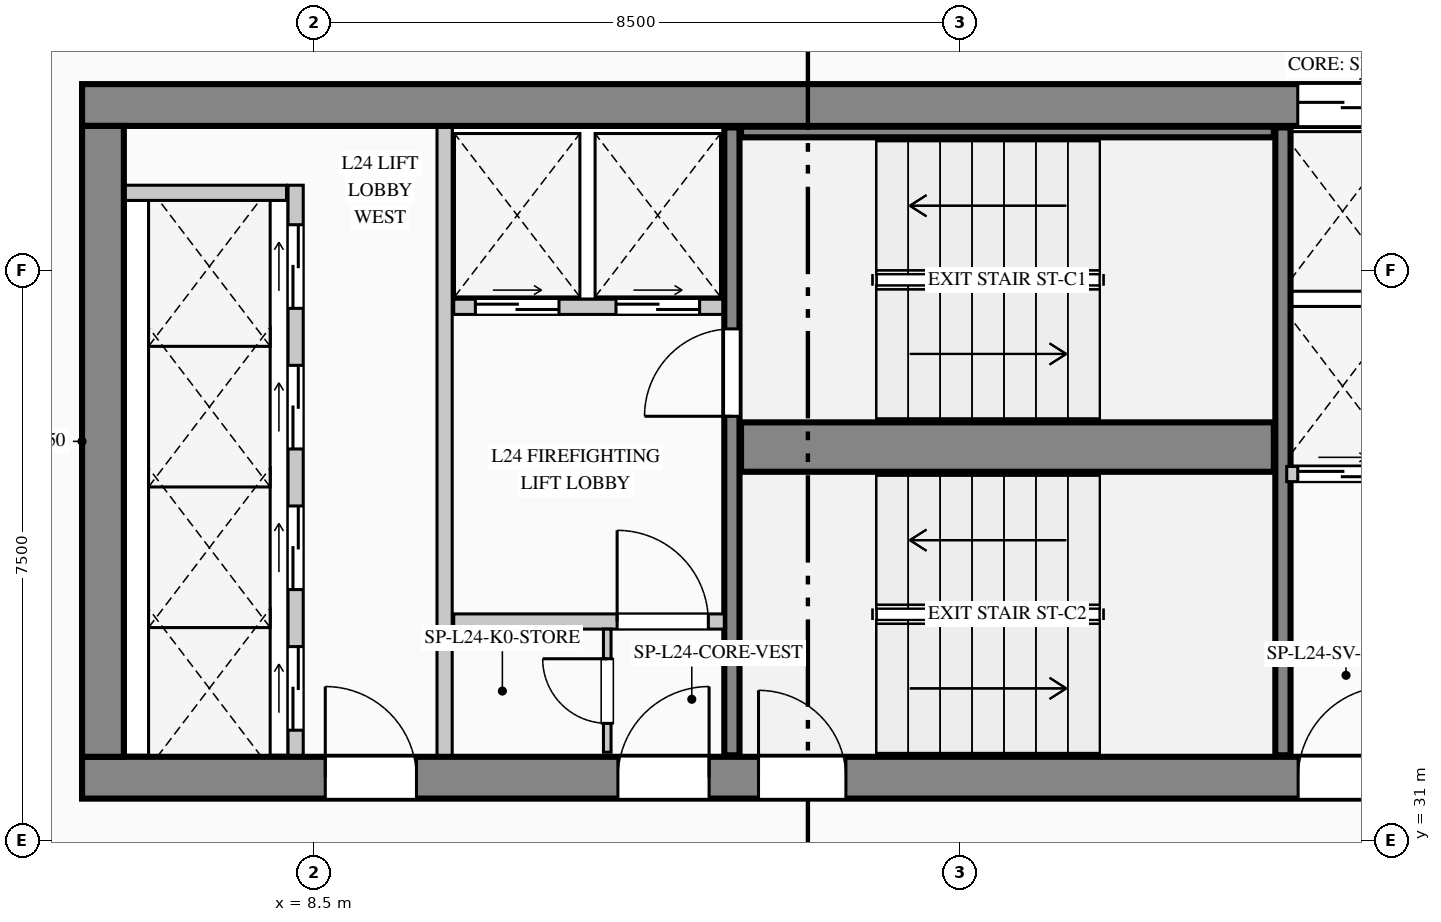
"""IFC4 building model, lengths in metres.
Left out: names, types, materials, properties, quantities, classifications, styles, units other than length and angle.
Written with IfcOpenShell. Run it as: python <this file> out.ifc"""

import sys

from ifc_helpers import new_model, si_unit, direction, frame, frame_2d, origin, place, context, subcontext, project, spatial, rectangle, extrude, element, fill, save


model = new_model("IFC4")
c1 = context("Model", 3, precision=1e-05, world=origin(), true_north=direction((0.0, 1.0)))
c2 = subcontext(c1, "Body", "Model", "MODEL_VIEW")
j1 = project(units=[si_unit("LENGTHUNIT", "METRE"), si_unit("PLANEANGLEUNIT", "RADIAN")], contexts=[c1])
p1 = place(None, origin())
s1 = spatial("IfcSite", under=j1, at=p1, CompositionType="ELEMENT")
p2 = place(p1, origin())
s2 = spatial("IfcBuilding", under=s1, at=p2, CompositionType="ELEMENT")
p3 = place(p2, frame((0.0, 0.0, 106.2)))
s3 = spatial("IfcBuildingStorey", under=s2, at=p3, CompositionType="ELEMENT", Elevation=106.2)
p4 = place(p3, frame((5.45, 40.675, 0.0), z_axis=(0.0, 0.0, 1.0), x_axis=(1.0, 0.0, 0.0)))
e1 = element("IfcWall", 1, at=p4, inside=s3, PredefinedType="SHEAR", context=c2, shape_type="SweptSolid", body=[
    extrude(rectangle(XDim=17.95, YDim=0.55, at=frame_2d((8.975, 0.0))), origin(), (0.0, 0.0, 1.0), 5.2),
])
p5 = place(p4, frame((15.995, 0.0, 0.0)))
e2 = element("IfcOpeningElement", 2, at=p5, cuts=e1, PredefinedType="OPENING", context=c2, shape_type="SweptSolid", body=[
    extrude(rectangle(XDim=1.18, YDim=2.25, at=frame_2d((0.59, 1.125))), frame((0.0, 0.285, 0.0), z_axis=(0.0, -1.0, 0.0), x_axis=(1.0, 0.0, 0.0)), (0.0, 0.0, 1.0), 0.57),
])
p6 = place(p3, frame((5.45, 31.825, 0.0), z_axis=(0.0, 0.0, 1.0), x_axis=(1.0, 0.0, 0.0)))
e3 = element("IfcWall", 3, at=p6, inside=s3, PredefinedType="SHEAR", context=c2, shape_type="SweptSolid", body=[
    extrude(rectangle(XDim=17.95, YDim=0.55, at=frame_2d((8.975, 0.0))), origin(), (0.0, 0.0, 1.0), 5.2),
])
p7 = place(p6, frame((3.2, 0.0, 0.0)))
e4 = element("IfcOpeningElement", 4, at=p7, cuts=e3, PredefinedType="OPENING", context=c2, shape_type="SweptSolid", body=[
    extrude(rectangle(XDim=1.2, YDim=2.2, at=frame_2d((0.6, 1.1))), frame((0.0, 0.285, 0.0), z_axis=(0.0, -1.0, 0.0), x_axis=(1.0, 0.0, 0.0)), (0.0, 0.0, 1.0), 0.57),
])
p8 = place(p6, frame((7.05, 0.0, 0.0)))
e5 = element("IfcOpeningElement", 5, at=p8, cuts=e3, PredefinedType="OPENING", context=c2, shape_type="SweptSolid", body=[
    extrude(rectangle(XDim=1.2, YDim=2.2, at=frame_2d((0.6, 1.1))), frame((0.0, 0.285, 0.0), z_axis=(0.0, -1.0, 0.0), x_axis=(1.0, 0.0, 0.0)), (0.0, 0.0, 1.0), 0.57),
])
p9 = place(p6, frame((8.9, 0.0, 0.0)))
e6 = element("IfcOpeningElement", 6, at=p9, cuts=e3, PredefinedType="OPENING", context=c2, shape_type="SweptSolid", body=[
    extrude(rectangle(XDim=1.15, YDim=2.2, at=frame_2d((0.575, 1.1))), frame((0.0, 0.285, 0.0), z_axis=(0.0, -1.0, 0.0), x_axis=(1.0, 0.0, 0.0)), (0.0, 0.0, 1.0), 0.57),
])
p10 = place(p6, frame((16.0, 0.0, 0.0)))
e7 = element("IfcOpeningElement", 7, at=p10, cuts=e3, PredefinedType="OPENING", context=c2, shape_type="SweptSolid", body=[
    extrude(rectangle(XDim=1.2, YDim=2.2, at=frame_2d((0.6, 1.1))), frame((0.0, 0.285, 0.0), z_axis=(0.0, -1.0, 0.0), x_axis=(1.0, 0.0, 0.0)), (0.0, 0.0, 1.0), 0.57),
])
p11 = place(p3, frame((5.725, 32.1, 0.0), z_axis=(0.0, 0.0, 1.0), x_axis=(0.0, 1.0, 0.0)))
e8 = element("IfcWall", 8, at=p11, inside=s3, PredefinedType="SHEAR", context=c2, shape_type="SweptSolid", body=[
    extrude(rectangle(XDim=8.3, YDim=0.55, at=frame_2d((4.15, 0.0))), origin(), (0.0, 0.0, 1.0), 5.2),
])
p12 = place(p3, frame((14.0, 32.12, 0.0), z_axis=(0.0, 0.0, 1.0), x_axis=(0.0, 1.0, 0.0)))
e9 = element("IfcWall", 9, at=p12, inside=s3, PredefinedType="SHEAR", context=c2, shape_type="SweptSolid", body=[
    extrude(rectangle(XDim=8.26, YDim=0.2, at=frame_2d((4.13, 0.0))), origin(), (0.0, 0.0, 1.0), 5.2),
])
p13 = place(p12, frame((4.46, 0.0, 0.0)))
e10 = element("IfcOpeningElement", 10, at=p13, cuts=e9, PredefinedType="OPENING", context=c2, shape_type="SweptSolid", body=[
    extrude(rectangle(XDim=1.15, YDim=2.2, at=frame_2d((0.575, 1.1))), frame((0.0, 0.11, 0.0), z_axis=(0.0, -1.0, 0.0), x_axis=(1.0, 0.0, 0.0)), (0.0, 0.0, 1.0), 0.22),
])
p14 = place(p3, frame((14.12, 36.175, 0.0), z_axis=(0.0, 0.0, 1.0), x_axis=(1.0, 0.0, 0.0)))
e11 = element("IfcWall", 11, at=p14, inside=s3, PredefinedType="SHEAR", context=c2, shape_type="SweptSolid", body=[
    extrude(rectangle(XDim=7.01, YDim=0.65, at=frame_2d((3.505, 0.0))), origin(), (0.0, 0.0, 1.0), 5.2),
])
p15 = place(p3, frame((21.25, 32.12, 0.0), z_axis=(0.0, 0.0, 1.0), x_axis=(0.0, 1.0, 0.0)))
e12 = element("IfcWall", 12, at=p15, inside=s3, PredefinedType="SHEAR", context=c2, shape_type="SweptSolid", body=[
    extrude(rectangle(XDim=8.26, YDim=0.2, at=frame_2d((4.13, 0.0))), origin(), (0.0, 0.0, 1.0), 5.2),
])
p16 = place(p3, frame((14.12, 40.32, 0.0), z_axis=(0.0, 0.0, 1.0), x_axis=(1.0, 0.0, 0.0)))
e13 = element("IfcWall", 13, at=p16, inside=s3, PredefinedType="SHEAR", context=c2, shape_type="SweptSolid", body=[
    extrude(rectangle(XDim=7.01, YDim=0.14, at=frame_2d((3.505, 0.0))), origin(), (0.0, 0.0, 1.0), 5.2),
])
p17 = place(p3, frame((8.002, 4.74, 0.0), z_axis=(0.0, 0.0, 1.0), x_axis=(-0.136991218313, 0.99057226193, 0.0)))
e14 = element("IfcWall", 14, at=p17, inside=s3, PredefinedType="STANDARD", context=c2, shape_type="SweptSolid", body=[
    extrude(rectangle(XDim=36.868, YDim=0.28, at=frame_2d((18.434, 0.0))), origin(), (0.0, 0.0, 1.0), 4.94),
])
p18 = place(p3, frame((8.26, 32.12, 0.0), z_axis=(0.0, 0.0, 1.0), x_axis=(0.0, 1.0, 0.0)))
e15 = element("IfcWall", 15, at=p18, inside=s3, PredefinedType="PARTITIONING", context=c2, shape_type="SweptSolid", body=[
    extrude(rectangle(XDim=7.5, YDim=0.2, at=frame_2d((3.75, 0.0))), origin(), (0.0, 0.0, 1.0), 4.94),
])
p19 = place(p18, frame((0.33, 0.0, 0.0)))
e16 = element("IfcOpeningElement", 16, at=p19, cuts=e15, PredefinedType="OPENING", context=c2, shape_type="SweptSolid", body=[
    extrude(rectangle(XDim=1.1, YDim=2.2, at=frame_2d((0.55, 1.1))), frame((0.0, 0.11, 0.0), z_axis=(0.0, -1.0, 0.0), x_axis=(1.0, 0.0, 0.0)), (0.0, 0.0, 1.0), 0.22),
])
p20 = place(p18, frame((2.18, 0.0, 0.0)))
e17 = element("IfcOpeningElement", 17, at=p20, cuts=e15, PredefinedType="OPENING", context=c2, shape_type="SweptSolid", body=[
    extrude(rectangle(XDim=1.1, YDim=2.2, at=frame_2d((0.55, 1.1))), frame((0.0, 0.11, 0.0), z_axis=(0.0, -1.0, 0.0), x_axis=(1.0, 0.0, 0.0)), (0.0, 0.0, 1.0), 0.22),
])
p21 = place(p18, frame((4.03, 0.0, 0.0)))
e18 = element("IfcOpeningElement", 18, at=p21, cuts=e15, PredefinedType="OPENING", context=c2, shape_type="SweptSolid", body=[
    extrude(rectangle(XDim=1.1, YDim=2.2, at=frame_2d((0.55, 1.1))), frame((0.0, 0.11, 0.0), z_axis=(0.0, -1.0, 0.0), x_axis=(1.0, 0.0, 0.0)), (0.0, 0.0, 1.0), 0.22),
])
p22 = place(p18, frame((5.88, 0.0, 0.0)))
e19 = element("IfcOpeningElement", 19, at=p22, cuts=e15, PredefinedType="OPENING", context=c2, shape_type="SweptSolid", body=[
    extrude(rectangle(XDim=1.1, YDim=2.2, at=frame_2d((0.55, 1.1))), frame((0.0, 0.11, 0.0), z_axis=(0.0, -1.0, 0.0), x_axis=(1.0, 0.0, 0.0)), (0.0, 0.0, 1.0), 0.22),
])
p23 = place(p3, frame((6.02, 39.52, 0.0), z_axis=(0.0, 0.0, 1.0), x_axis=(1.0, 0.0, 0.0)))
e20 = element("IfcWall", 20, at=p23, inside=s3, PredefinedType="PARTITIONING", context=c2, shape_type="SweptSolid", body=[
    extrude(rectangle(XDim=2.12, YDim=0.2, at=frame_2d((1.06, 0.0))), origin(), (0.0, 0.0, 1.0), 4.94),
])
p24 = place(p3, frame((10.22, 32.12, 0.0), z_axis=(0.0, 0.0, 1.0), x_axis=(0.0, 1.0, 0.0)))
e21 = element("IfcWall", 21, at=p24, inside=s3, PredefinedType="PARTITIONING", context=c2, shape_type="SweptSolid", body=[
    extrude(rectangle(XDim=8.26, YDim=0.2, at=frame_2d((4.13, 0.0))), origin(), (0.0, 0.0, 1.0), 4.94),
])
p25 = place(p3, frame((10.34, 38.02, 0.0), z_axis=(0.0, 0.0, 1.0), x_axis=(1.0, 0.0, 0.0)))
e22 = element("IfcWall", 22, at=p25, inside=s3, PredefinedType="PARTITIONING", context=c2, shape_type="SweptSolid", body=[
    extrude(rectangle(XDim=3.54, YDim=0.2, at=frame_2d((1.77, 0.0))), origin(), (0.0, 0.0, 1.0), 4.94),
])
p26 = place(p25, frame((0.285, 0.0, 0.0)))
e23 = element("IfcOpeningElement", 23, at=p26, cuts=e22, PredefinedType="OPENING", context=c2, shape_type="SweptSolid", body=[
    extrude(rectangle(XDim=1.1, YDim=2.2, at=frame_2d((0.55, 1.1))), frame((0.0, 0.11, 0.0), z_axis=(0.0, -1.0, 0.0), x_axis=(1.0, 0.0, 0.0)), (0.0, 0.0, 1.0), 0.22),
])
p27 = place(p25, frame((2.135, 0.0, 0.0)))
e24 = element("IfcOpeningElement", 24, at=p27, cuts=e22, PredefinedType="OPENING", context=c2, shape_type="SweptSolid", body=[
    extrude(rectangle(XDim=1.1, YDim=2.2, at=frame_2d((0.55, 1.1))), frame((0.0, 0.11, 0.0), z_axis=(0.0, -1.0, 0.0), x_axis=(1.0, 0.0, 0.0)), (0.0, 0.0, 1.0), 0.22),
])
p28 = place(p3, frame((10.34, 33.88, 0.0), z_axis=(0.0, 0.0, 1.0), x_axis=(1.0, 0.0, 0.0)))
e25 = element("IfcWall", 25, at=p28, inside=s3, PredefinedType="PARTITIONING", context=c2, shape_type="SweptSolid", body=[
    extrude(rectangle(XDim=3.56, YDim=0.2, at=frame_2d((1.78, 0.0))), origin(), (0.0, 0.0, 1.0), 4.94),
])
p29 = place(p28, frame((2.15, 0.0, 0.0)))
e26 = element("IfcOpeningElement", 26, at=p29, cuts=e25, PredefinedType="OPENING", context=c2, shape_type="SweptSolid", body=[
    extrude(rectangle(XDim=1.2, YDim=2.2, at=frame_2d((0.6, 1.1))), frame((0.0, 0.11, 0.0), z_axis=(0.0, -1.0, 0.0), x_axis=(1.0, 0.0, 0.0)), (0.0, 0.0, 1.0), 0.22),
])
p30 = place(p3, frame((12.36, 32.16, 0.0), z_axis=(0.0, 0.0, 1.0), x_axis=(0.0, 1.0, 0.0)))
e27 = element("IfcWall", 27, at=p30, inside=s3, PredefinedType="PARTITIONING", context=c2, shape_type="SweptSolid", body=[
    extrude(rectangle(XDim=1.62, YDim=0.1, at=frame_2d((0.81, 0.0))), origin(), (0.0, 0.0, 1.0), 4.94),
])
p31 = place(p30, frame((0.38, 0.0, 0.0)))
e28 = element("IfcOpeningElement", 28, at=p31, cuts=e27, PredefinedType="OPENING", context=c2, shape_type="SweptSolid", body=[
    extrude(rectangle(XDim=0.85, YDim=2.1, at=frame_2d((0.425, 1.05))), frame((0.0, 0.06, 0.0), z_axis=(0.0, -1.0, 0.0), x_axis=(1.0, 0.0, 0.0)), (0.0, 0.0, 1.0), 0.12),
])
p32 = place(p3, frame((21.3, 35.82, 0.0), z_axis=(0.0, 0.0, 1.0), x_axis=(1.0, 0.0, 0.0)))
e29 = element("IfcWall", 29, at=p32, inside=s3, PredefinedType="PARTITIONING", context=c2, shape_type="SweptSolid", body=[
    extrude(rectangle(XDim=1.5, YDim=0.2, at=frame_2d((0.75, 0.0))), origin(), (0.0, 0.0, 1.0), 4.94),
])
p33 = place(p32, frame((0.145, 0.0, 0.0)))
e30 = element("IfcOpeningElement", 30, at=p33, cuts=e29, PredefinedType="OPENING", context=c2, shape_type="SweptSolid", body=[
    extrude(rectangle(XDim=1.18, YDim=2.25, at=frame_2d((0.59, 1.125))), frame((0.0, 0.11, 0.0), z_axis=(0.0, -1.0, 0.0), x_axis=(1.0, 0.0, 0.0)), (0.0, 0.0, 1.0), 0.22),
])
p34 = place(p7, origin())
e31 = element("IfcDoor", 31, at=p34, inside=s3, OperationType="SINGLE_SWING_LEFT", PredefinedType="DOOR", context=c2, shape_type="SweptSolid", body=[
    extrude(rectangle(XDim=1.2, YDim=2.2, at=frame_2d((0.6, 1.1))), frame((0.0, 0.025, 0.0), z_axis=(0.0, -1.0, 0.0), x_axis=(1.0, 0.0, 0.0)), (0.0, 0.0, 1.0), 0.05),
])
fill(e4, e31)
p35 = place(p8, origin())
e32 = element("IfcDoor", 32, at=p35, inside=s3, OperationType="SINGLE_SWING_RIGHT", PredefinedType="DOOR", context=c2, shape_type="SweptSolid", body=[
    extrude(rectangle(XDim=1.2, YDim=2.2, at=frame_2d((0.6, 1.1))), frame((0.0, 0.025, 0.0), z_axis=(0.0, -1.0, 0.0), x_axis=(1.0, 0.0, 0.0)), (0.0, 0.0, 1.0), 0.05),
])
fill(e5, e32)
p36 = place(p9, origin())
e33 = element("IfcDoor", 33, at=p36, inside=s3, OperationType="SINGLE_SWING_LEFT", PredefinedType="DOOR", context=c2, shape_type="SweptSolid", body=[
    extrude(rectangle(XDim=1.15, YDim=2.2, at=frame_2d((0.575, 1.1))), frame((0.0, 0.025, 0.0), z_axis=(0.0, -1.0, 0.0), x_axis=(1.0, 0.0, 0.0)), (0.0, 0.0, 1.0), 0.05),
])
fill(e6, e33)
p37 = place(p10, origin())
e34 = element("IfcDoor", 34, at=p37, inside=s3, OperationType="SINGLE_SWING_RIGHT", PredefinedType="DOOR", context=c2, shape_type="SweptSolid", body=[
    extrude(rectangle(XDim=1.2, YDim=2.2, at=frame_2d((0.6, 1.1))), frame((0.0, 0.025, 0.0), z_axis=(0.0, -1.0, 0.0), x_axis=(1.0, 0.0, 0.0)), (0.0, 0.0, 1.0), 0.05),
])
fill(e7, e34)
p38 = place(p29, origin())
e35 = element("IfcDoor", 35, at=p38, inside=s3, OperationType="SINGLE_SWING_LEFT", PredefinedType="DOOR", context=c2, shape_type="SweptSolid", body=[
    extrude(rectangle(XDim=1.2, YDim=2.2, at=frame_2d((0.6, 1.1))), frame((0.0, 0.025, 0.0), z_axis=(0.0, -1.0, 0.0), x_axis=(1.0, 0.0, 0.0)), (0.0, 0.0, 1.0), 0.05),
])
fill(e26, e35)
p39 = place(p31, origin())
e36 = element("IfcDoor", 36, at=p39, inside=s3, OperationType="SINGLE_SWING_RIGHT", PredefinedType="DOOR", context=c2, shape_type="SweptSolid", body=[
    extrude(rectangle(XDim=0.85, YDim=2.1, at=frame_2d((0.425, 1.05))), frame((0.0, 0.025, 0.0), z_axis=(0.0, -1.0, 0.0), x_axis=(1.0, 0.0, 0.0)), (0.0, 0.0, 1.0), 0.05),
])
fill(e28, e36)
p40 = place(p13, origin())
e37 = element("IfcDoor", 37, at=p40, inside=s3, OperationType="SINGLE_SWING_LEFT", PredefinedType="DOOR", context=c2, shape_type="SweptSolid", body=[
    extrude(rectangle(XDim=1.15, YDim=2.2, at=frame_2d((0.575, 1.1))), frame((0.0, 0.025, 0.0), z_axis=(0.0, -1.0, 0.0), x_axis=(1.0, 0.0, 0.0)), (0.0, 0.0, 1.0), 0.05),
])
fill(e10, e37)
p41 = place(p19, origin())
e38 = element("IfcDoor", 38, at=p41, inside=s3, OperationType="DOUBLE_DOOR_SLIDING", PredefinedType="DOOR", context=c2, shape_type="SweptSolid", body=[
    extrude(rectangle(XDim=1.1, YDim=2.2, at=frame_2d((0.55, 1.1))), frame((0.0, 0.025, 0.0), z_axis=(0.0, -1.0, 0.0), x_axis=(1.0, 0.0, 0.0)), (0.0, 0.0, 1.0), 0.05),
])
fill(e16, e38)
p42 = place(p20, origin())
e39 = element("IfcDoor", 39, at=p42, inside=s3, OperationType="DOUBLE_DOOR_SLIDING", PredefinedType="DOOR", context=c2, shape_type="SweptSolid", body=[
    extrude(rectangle(XDim=1.1, YDim=2.2, at=frame_2d((0.55, 1.1))), frame((0.0, 0.025, 0.0), z_axis=(0.0, -1.0, 0.0), x_axis=(1.0, 0.0, 0.0)), (0.0, 0.0, 1.0), 0.05),
])
fill(e17, e39)
p43 = place(p21, origin())
e40 = element("IfcDoor", 40, at=p43, inside=s3, OperationType="DOUBLE_DOOR_SLIDING", PredefinedType="DOOR", context=c2, shape_type="SweptSolid", body=[
    extrude(rectangle(XDim=1.1, YDim=2.2, at=frame_2d((0.55, 1.1))), frame((0.0, 0.025, 0.0), z_axis=(0.0, -1.0, 0.0), x_axis=(1.0, 0.0, 0.0)), (0.0, 0.0, 1.0), 0.05),
])
fill(e18, e40)
p44 = place(p22, origin())
e41 = element("IfcDoor", 41, at=p44, inside=s3, OperationType="DOUBLE_DOOR_SLIDING", PredefinedType="DOOR", context=c2, shape_type="SweptSolid", body=[
    extrude(rectangle(XDim=1.1, YDim=2.2, at=frame_2d((0.55, 1.1))), frame((0.0, 0.025, 0.0), z_axis=(0.0, -1.0, 0.0), x_axis=(1.0, 0.0, 0.0)), (0.0, 0.0, 1.0), 0.05),
])
fill(e19, e41)
p45 = place(p26, origin())
e42 = element("IfcDoor", 42, at=p45, inside=s3, OperationType="DOUBLE_DOOR_SLIDING", PredefinedType="DOOR", context=c2, shape_type="SweptSolid", body=[
    extrude(rectangle(XDim=1.1, YDim=2.2, at=frame_2d((0.55, 1.1))), frame((0.0, 0.025, 0.0), z_axis=(0.0, -1.0, 0.0), x_axis=(1.0, 0.0, 0.0)), (0.0, 0.0, 1.0), 0.05),
])
fill(e23, e42)
p46 = place(p27, origin())
e43 = element("IfcDoor", 43, at=p46, inside=s3, OperationType="DOUBLE_DOOR_SLIDING", PredefinedType="DOOR", context=c2, shape_type="SweptSolid", body=[
    extrude(rectangle(XDim=1.1, YDim=2.2, at=frame_2d((0.55, 1.1))), frame((0.0, 0.025, 0.0), z_axis=(0.0, -1.0, 0.0), x_axis=(1.0, 0.0, 0.0)), (0.0, 0.0, 1.0), 0.05),
])
fill(e24, e43)
p47 = place(p5, origin())
e44 = element("IfcDoor", 44, at=p47, inside=s3, OperationType="DOUBLE_DOOR_SLIDING", PredefinedType="DOOR", context=c2, shape_type="SweptSolid", body=[
    extrude(rectangle(XDim=1.18, YDim=2.25, at=frame_2d((0.59, 1.125))), frame((0.0, 0.025, 0.0), z_axis=(0.0, -1.0, 0.0), x_axis=(1.0, 0.0, 0.0)), (0.0, 0.0, 1.0), 0.05),
])
fill(e2, e44)
p48 = place(p33, origin())
e45 = element("IfcDoor", 45, at=p48, inside=s3, OperationType="DOUBLE_DOOR_SLIDING", PredefinedType="DOOR", context=c2, shape_type="SweptSolid", body=[
    extrude(rectangle(XDim=1.18, YDim=2.25, at=frame_2d((0.59, 1.125))), frame((0.0, 0.025, 0.0), z_axis=(0.0, -1.0, 0.0), x_axis=(1.0, 0.0, 0.0)), (0.0, 0.0, 1.0), 0.05),
])
fill(e30, e45)
save(model, sys.argv[1])
